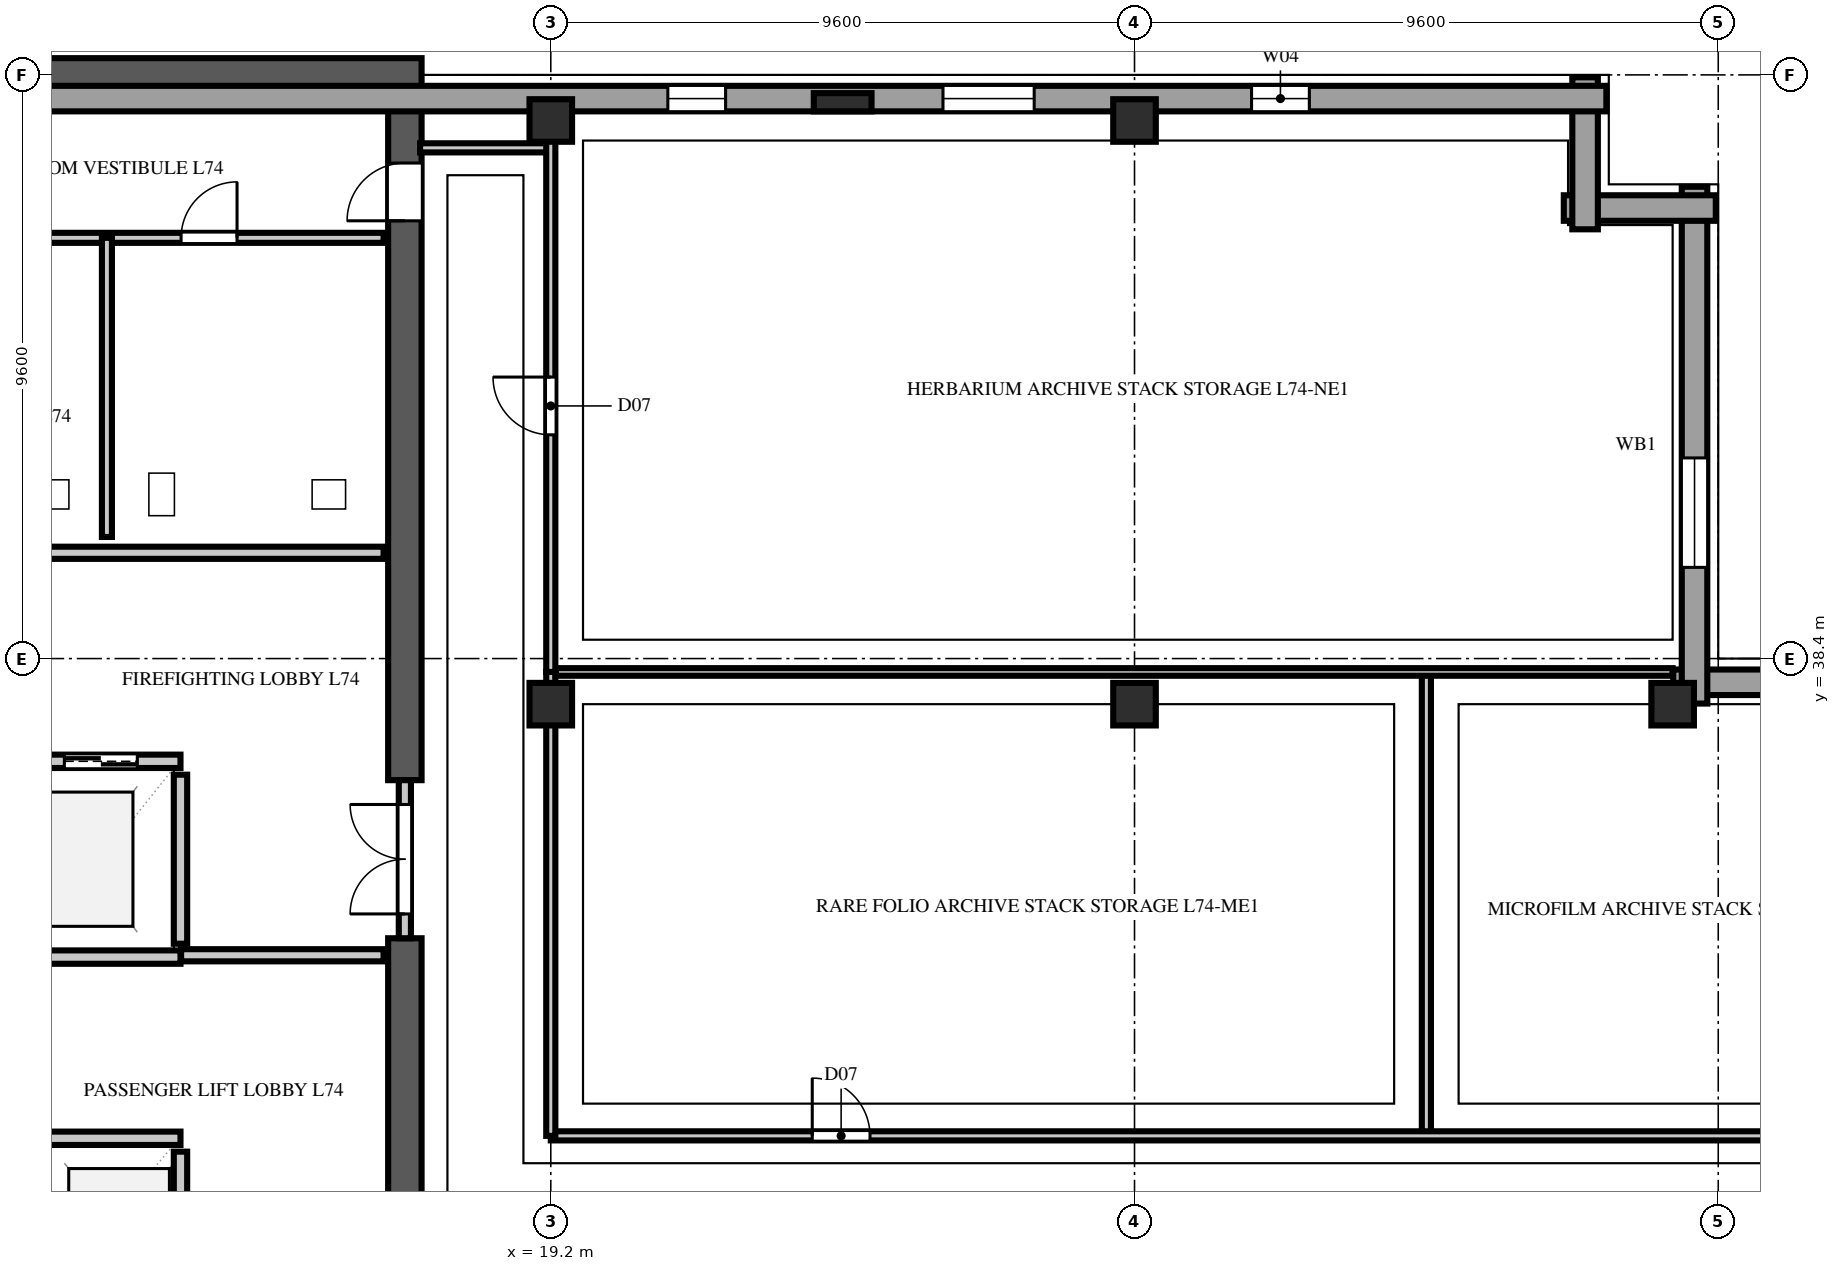
"""IFC4 building model, lengths in metres.
Left out: names, types, materials, properties, quantities, classifications, styles, units other than length and angle.
Written with IfcOpenShell. Run it as: python <this file> out.ifc"""

import sys

from ifc_helpers import new_model, si_unit, direction, frame, frame_2d, origin, origin_2d, place, context, subcontext, project, spatial, rectangle, extrude, element, fill, save


model = new_model("IFC4")
c1 = context("Model", 3, precision=1e-05, world=origin(), true_north=direction((0.0, 1.0)))
c2 = subcontext(c1, "Body", "Model", "MODEL_VIEW")
j1 = project(units=[si_unit("LENGTHUNIT", "METRE"), si_unit("PLANEANGLEUNIT", "RADIAN")], contexts=[c1])
p1 = place(None, origin())
s1 = spatial("IfcSite", under=j1, at=p1, CompositionType="ELEMENT")
p2 = place(p1, origin())
s2 = spatial("IfcBuilding", under=s1, at=p2, CompositionType="ELEMENT")
p3 = place(p2, frame((0.0, 0.0, 292.4)))
s3 = spatial("IfcBuildingStorey", under=s2, at=p3, CompositionType="ELEMENT", Elevation=292.4)
p4 = place(p3, frame((2.475, 48.0, 0.0), z_axis=(0.0, 0.0, 1.0), x_axis=(1.0, 0.0, 0.0)))
e1 = element("IfcWall", 1, at=p4, inside=s3, PredefinedType="SHEAR", context=c2, shape_type="SweptSolid", body=[
    extrude(rectangle(XDim=14.6, YDim=0.55, at=frame_2d((7.3, 0.0))), origin(), (0.0, 0.0, 1.0), 3.54),
])
p5 = place(p3, frame((16.8, 26.0, 0.0), z_axis=(0.0, 0.0, 1.0), x_axis=(0.0, 1.0, 0.0)))
e2 = element("IfcWall", 2, at=p5, inside=s3, PredefinedType="SHEAR", context=c2, shape_type="SweptSolid", body=[
    extrude(rectangle(XDim=7.8, YDim=0.55, at=frame_2d((3.9, 0.0))), origin(), (0.0, 0.0, 1.0), 3.54),
])
p6 = place(p3, frame((16.8, 36.4, 0.0), z_axis=(0.0, 0.0, 1.0), x_axis=(0.0, 1.0, 0.0)))
e3 = element("IfcWall", 3, at=p6, inside=s3, PredefinedType="SHEAR", context=c2, shape_type="SweptSolid", body=[
    extrude(rectangle(XDim=11.325, YDim=0.55, at=frame_2d((5.663, 0.0))), origin(), (0.0, 0.0, 1.0), 3.54),
])
p7 = place(p6, frame((9.2, 0.0, 0.0)))
e4 = element("IfcOpeningElement", 4, at=p7, cuts=e3, PredefinedType="OPENING", context=c2, shape_type="SweptSolid", body=[
    extrude(rectangle(XDim=0.95, YDim=2.15, at=frame_2d((0.475, 1.075))), frame((0.0, 0.287, 0.0), z_axis=(0.0, -1.0, 0.0), x_axis=(1.0, 0.0, 0.0)), (0.0, 0.0, 1.0), 0.574),
])
for number, where, z_axis, x_axis in (
    (5, (19.2, 37.65, 0.0), (0.0, 0.0, 1.0), (1.0, 0.0, 0.0)),
    (6, (19.2, 47.25, 0.0), (0.0, 0.0, 1.0), (1.0, 0.0, 0.0)),
    (7, (28.8, 37.65, 0.0), (0.0, 0.0, 1.0), (1.0, 0.0, 0.0)),
    (8, (28.8, 47.25, 0.0), (0.0, 0.0, 1.0), (1.0, 0.0, 0.0)),
    (9, (37.65, 37.65, 0.0), (0.0, 0.0, 1.0), (1.0, 0.0, 0.0)),
):
    element("IfcColumn", number, at=place(p3, frame(where, z_axis=z_axis, x_axis=x_axis)), inside=s3, PredefinedType="COLUMN", context=c2, shape_type="SweptSolid", body=[
        extrude(rectangle(XDim=0.7, YDim=0.7, at=origin_2d()), origin(), (0.0, 0.0, 1.0), 3.8),
    ])
p8 = place(p3, frame((24.0, 47.55, 0.0), z_axis=(0.0, 0.0, 1.0), x_axis=(1.0, 0.0, 0.0)))
e10 = element("IfcColumn", 10, at=p8, inside=s3, PredefinedType="PILASTER", context=c2, shape_type="SweptSolid", body=[
    extrude(rectangle(XDim=0.95, YDim=0.3, at=origin_2d()), origin(), (0.0, 0.0, 1.0), 3.8),
])
p9 = place(p3, frame((46.16, 38.01, 0.0), z_axis=(0.0, 0.0, 1.0), x_axis=(-1.0, 0.0, 0.0)))
e11 = element("IfcWall", 11, at=p9, inside=s3, PredefinedType="SOLIDWALL", context=c2, shape_type="SweptSolid", body=[
    extrude(rectangle(XDim=8.5, YDim=0.42, at=frame_2d((4.25, 0.0))), origin(), (0.0, 0.0, 1.0), 3.54),
])
p10 = place(p9, frame((4.46, 0.0, 0.85)))
e12 = element("IfcOpeningElement", 12, at=p10, cuts=e11, PredefinedType="OPENING", context=c2, shape_type="SweptSolid", body=[
    extrude(rectangle(XDim=1.8, YDim=1.85, at=frame_2d((0.9, 0.925))), frame((0.0, 0.222, 0.0), z_axis=(0.0, -1.0, 0.0), x_axis=(1.0, 0.0, 0.0)), (0.0, 0.0, 1.0), 0.444),
])
p11 = place(p3, frame((38.01, 37.66, 0.0), z_axis=(0.0, 0.0, 1.0), x_axis=(0.0, 1.0, 0.0)))
e13 = element("IfcWall", 13, at=p11, inside=s3, PredefinedType="SOLIDWALL", context=c2, shape_type="SweptSolid", body=[
    extrude(rectangle(XDim=8.5, YDim=0.42, at=frame_2d((4.25, 0.0))), origin(), (0.0, 0.0, 1.0), 3.54),
])
p12 = place(p11, frame((2.24, 0.0, 0.85)))
e14 = element("IfcOpeningElement", 14, at=p12, cuts=e13, PredefinedType="OPENING", context=c2, shape_type="SweptSolid", body=[
    extrude(rectangle(XDim=1.8, YDim=1.85, at=frame_2d((0.9, 0.925))), frame((0.0, 0.222, 0.0), z_axis=(0.0, -1.0, 0.0), x_axis=(1.0, 0.0, 0.0)), (0.0, 0.0, 1.0), 0.444),
])
for number, where, z_axis, x_axis in (
    (15, (38.36, 45.81, 0.0), (0.0, 0.0, 1.0), (-1.0, 0.0, 0.0)),
    (16, (36.21, 45.46, 0.0), (0.0, 0.0, 1.0), (0.0, 1.0, 0.0)),
):
    element("IfcWall", number, at=place(p3, frame(where, z_axis=z_axis, x_axis=x_axis)), inside=s3, PredefinedType="SOLIDWALL", context=c2, shape_type="SweptSolid", body=[
        extrude(rectangle(XDim=2.5, YDim=0.42, at=frame_2d((1.25, 0.0))), origin(), (0.0, 0.0, 1.0), 3.54),
    ])
p13 = place(p3, frame((36.56, 47.61, 0.0), z_axis=(0.0, 0.0, 1.0), x_axis=(-1.0, 0.0, 0.0)))
e17 = element("IfcWall", 17, at=p13, inside=s3, PredefinedType="SOLIDWALL", context=c2, shape_type="SweptSolid", body=[
    extrude(rectangle(XDim=34.085, YDim=0.42, at=frame_2d((17.042, 0.0))), origin(), (0.0, 0.0, 1.0), 3.54),
])
p14 = place(p13, frame((4.885, 0.0, 0.9)))
e18 = element("IfcOpeningElement", 18, at=p14, cuts=e17, PredefinedType="OPENING", context=c2, shape_type="SweptSolid", body=[
    extrude(rectangle(XDim=0.95, YDim=1.85, at=frame_2d((0.475, 0.925))), frame((0.0, 0.222, 0.0), z_axis=(0.0, -1.0, 0.0), x_axis=(1.0, 0.0, 0.0)), (0.0, 0.0, 1.0), 0.444),
])
p15 = place(p13, frame((9.41, 0.0, 0.9)))
e19 = element("IfcOpeningElement", 19, at=p15, cuts=e17, PredefinedType="OPENING", context=c2, shape_type="SweptSolid", body=[
    extrude(rectangle(XDim=1.5, YDim=1.85, at=frame_2d((0.75, 0.925))), frame((0.0, 0.222, 0.0), z_axis=(0.0, -1.0, 0.0), x_axis=(1.0, 0.0, 0.0)), (0.0, 0.0, 1.0), 0.444),
])
p16 = place(p13, frame((14.485, 0.0, 0.9)))
e20 = element("IfcOpeningElement", 20, at=p16, cuts=e17, PredefinedType="OPENING", context=c2, shape_type="SweptSolid", body=[
    extrude(rectangle(XDim=0.95, YDim=1.85, at=frame_2d((0.475, 0.925))), frame((0.0, 0.222, 0.0), z_axis=(0.0, -1.0, 0.0), x_axis=(1.0, 0.0, 0.0)), (0.0, 0.0, 1.0), 0.444),
])
p17 = place(p3, frame((13.11, 27.71, 0.0), z_axis=(0.0, 0.0, 1.0), x_axis=(0.0, 1.0, 0.0)))
e21 = element("IfcWall", 21, at=p17, inside=s3, PredefinedType="SOLIDWALL", context=c2, shape_type="SweptSolid", body=[
    extrude(rectangle(XDim=2.58, YDim=0.22, at=frame_2d((1.29, 0.0))), origin(), (0.0, 0.0, 1.0), 3.54),
])
p18 = place(p3, frame((10.49, 30.51, 0.0), z_axis=(0.0, 0.0, 1.0), x_axis=(1.0, 0.0, 0.0)))
e22 = element("IfcWall", 22, at=p18, inside=s3, PredefinedType="SOLIDWALL", context=c2, shape_type="SweptSolid", body=[
    extrude(rectangle(XDim=2.62, YDim=0.22, at=frame_2d((1.31, 0.0))), origin(), (0.0, 0.0, 1.0), 3.54),
])
p19 = place(p3, frame((13.11, 33.71, 0.0), z_axis=(0.0, 0.0, 1.0), x_axis=(0.0, 1.0, 0.0)))
e23 = element("IfcWall", 23, at=p19, inside=s3, PredefinedType="SOLIDWALL", context=c2, shape_type="SweptSolid", body=[
    extrude(rectangle(XDim=2.78, YDim=0.22, at=frame_2d((1.39, 0.0))), origin(), (0.0, 0.0, 1.0), 3.54),
])
p20 = place(p3, frame((10.49, 33.49, 0.0), z_axis=(0.0, 0.0, 1.0), x_axis=(1.0, 0.0, 0.0)))
e24 = element("IfcWall", 24, at=p20, inside=s3, PredefinedType="SOLIDWALL", context=c2, shape_type="SweptSolid", body=[
    extrude(rectangle(XDim=2.62, YDim=0.22, at=frame_2d((1.31, 0.0))), origin(), (0.0, 0.0, 1.0), 3.54),
])
p21 = place(p3, frame((10.49, 36.71, 0.0), z_axis=(0.0, 0.0, 1.0), x_axis=(1.0, 0.0, 0.0)))
e25 = element("IfcWall", 25, at=p21, inside=s3, PredefinedType="SOLIDWALL", context=c2, shape_type="SweptSolid", body=[
    extrude(rectangle(XDim=2.62, YDim=0.22, at=frame_2d((1.31, 0.0))), origin(), (0.0, 0.0, 1.0), 3.54),
])
p22 = place(p21, frame((0.71, 0.0, 0.0)))
e26 = element("IfcOpeningElement", 26, at=p22, cuts=e25, PredefinedType="OPENING", context=c2, shape_type="SweptSolid", body=[
    extrude(rectangle(XDim=1.2, YDim=2.2, at=frame_2d((0.6, 1.1))), frame((0.0, 0.122, 0.0), z_axis=(0.0, -1.0, 0.0), x_axis=(1.0, 0.0, 0.0)), (0.0, 0.0, 1.0), 0.244),
])
p23 = place(p3, frame((13.12, 33.52, 0.0), z_axis=(0.0, 0.0, 1.0), x_axis=(1.0, 0.0, 0.0)))
e27 = element("IfcWall", 27, at=p23, inside=s3, PredefinedType="SOLIDWALL", context=c2, shape_type="SweptSolid", body=[
    extrude(rectangle(XDim=3.33, YDim=0.2, at=frame_2d((1.665, 0.0))), origin(), (0.0, 0.0, 1.0), 3.54),
])
p24 = place(p3, frame((6.32, 40.14, 0.0), z_axis=(0.0, 0.0, 1.0), x_axis=(1.0, 0.0, 0.0)))
e28 = element("IfcWall", 28, at=p24, inside=s3, PredefinedType="SOLIDWALL", context=c2, shape_type="SweptSolid", body=[
    extrude(rectangle(XDim=10.13, YDim=0.2, at=frame_2d((5.065, 0.0))), origin(), (0.0, 0.0, 1.0), 3.54),
])
p25 = place(p3, frame((16.8, 33.8, 0.0), z_axis=(0.0, 0.0, 1.0), x_axis=(0.0, 1.0, 0.0)))
e29 = element("IfcWall", 29, at=p25, inside=s3, PredefinedType="SOLIDWALL", context=c2, shape_type="SweptSolid", body=[
    extrude(rectangle(XDim=2.6, YDim=0.2, at=frame_2d((1.3, 0.0))), origin(), (0.0, 0.0, 1.0), 3.54),
])
p26 = place(p25, frame((0.4, 0.0, 0.0)))
e30 = element("IfcOpeningElement", 30, at=p26, cuts=e29, PredefinedType="OPENING", context=c2, shape_type="SweptSolid", body=[
    extrude(rectangle(XDim=1.8, YDim=2.2, at=frame_2d((0.9, 1.1))), frame((0.0, 0.112, 0.0), z_axis=(0.0, -1.0, 0.0), x_axis=(1.0, 0.0, 0.0)), (0.0, 0.0, 1.0), 0.224),
])
p27 = place(p3, frame((6.32, 45.32, 0.0), z_axis=(0.0, 0.0, 1.0), x_axis=(1.0, 0.0, 0.0)))
e31 = element("IfcWall", 31, at=p27, inside=s3, PredefinedType="PLUMBINGWALL", context=c2, shape_type="SweptSolid", body=[
    extrude(rectangle(XDim=10.13, YDim=0.165, at=frame_2d((5.065, 0.0))), origin(), (0.0, 0.0, 1.0), 3.54),
])
p28 = place(p27, frame((1.8, 0.0, 0.0)))
e32 = element("IfcOpeningElement", 32, at=p28, cuts=e31, PredefinedType="OPENING", context=c2, shape_type="SweptSolid", body=[
    extrude(rectangle(XDim=0.92, YDim=2.15, at=frame_2d((0.46, 1.075))), frame((0.0, 0.094, 0.0), z_axis=(0.0, -1.0, 0.0), x_axis=(1.0, 0.0, 0.0)), (0.0, 0.0, 1.0), 0.189),
])
p29 = place(p27, frame((6.8, 0.0, 0.0)))
e33 = element("IfcOpeningElement", 33, at=p29, cuts=e31, PredefinedType="OPENING", context=c2, shape_type="SweptSolid", body=[
    extrude(rectangle(XDim=0.92, YDim=2.15, at=frame_2d((0.46, 1.075))), frame((0.0, 0.094, 0.0), z_axis=(0.0, -1.0, 0.0), x_axis=(1.0, 0.0, 0.0)), (0.0, 0.0, 1.0), 0.189),
])
p30 = place(p3, frame((11.9, 40.4, 0.0), z_axis=(0.0, 0.0, 1.0), x_axis=(0.0, 1.0, 0.0)))
e34 = element("IfcWall", 34, at=p30, inside=s3, PredefinedType="PLUMBINGWALL", context=c2, shape_type="SweptSolid", body=[
    extrude(rectangle(XDim=4.92, YDim=0.165, at=frame_2d((2.46, 0.0))), origin(), (0.0, 0.0, 1.0), 3.54),
])
p31 = place(p3, frame((17.05, 46.8, 0.0), z_axis=(0.0, 0.0, 1.0), x_axis=(1.0, 0.0, 0.0)))
e35 = element("IfcWall", 35, at=p31, inside=s3, PredefinedType="PARTITIONING", context=c2, shape_type="SweptSolid", body=[
    extrude(rectangle(XDim=2.15, YDim=0.15, at=frame_2d((1.075, 0.0))), origin(), (0.0, 0.0, 1.0), 3.54),
])
p32 = place(p3, frame((33.6, 30.55, 0.0), z_axis=(0.0, 0.0, 1.0), x_axis=(0.0, 1.0, 0.0)))
e36 = element("IfcWall", 36, at=p32, inside=s3, PredefinedType="PARTITIONING", context=c2, shape_type="SweptSolid", body=[
    extrude(rectangle(XDim=7.63, YDim=0.15, at=frame_2d((3.815, 0.0))), origin(), (0.0, 0.0, 1.0), 3.54),
])
p33 = place(p3, frame((19.2, 30.55, 0.0), z_axis=(0.0, 0.0, 1.0), x_axis=(1.0, 0.0, 0.0)))
e37 = element("IfcWall", 37, at=p33, inside=s3, PredefinedType="PARTITIONING", context=c2, shape_type="SweptSolid", body=[
    extrude(rectangle(XDim=28.58, YDim=0.15, at=frame_2d((14.29, 0.0))), origin(), (0.0, 0.0, 1.0), 3.54),
])
p34 = place(p33, frame((4.3, 0.0, 0.0)))
e38 = element("IfcOpeningElement", 38, at=p34, cuts=e37, PredefinedType="OPENING", context=c2, shape_type="SweptSolid", body=[
    extrude(rectangle(XDim=0.95, YDim=2.15, at=frame_2d((0.475, 1.075))), frame((0.0, 0.087, 0.0), z_axis=(0.0, -1.0, 0.0), x_axis=(1.0, 0.0, 0.0)), (0.0, 0.0, 1.0), 0.174),
])
p35 = place(p33, frame((22.45, 0.0, 0.0)))
e39 = element("IfcOpeningElement", 39, at=p35, cuts=e37, PredefinedType="OPENING", context=c2, shape_type="SweptSolid", body=[
    extrude(rectangle(XDim=0.95, YDim=2.15, at=frame_2d((0.475, 1.075))), frame((0.0, 0.087, 0.0), z_axis=(0.0, -1.0, 0.0), x_axis=(1.0, 0.0, 0.0)), (0.0, 0.0, 1.0), 0.174),
])
p36 = place(p3, frame((19.2, 30.55, 0.0), z_axis=(0.0, 0.0, 1.0), x_axis=(0.0, 1.0, 0.0)))
e40 = element("IfcWall", 40, at=p36, inside=s3, PredefinedType="PARTITIONING", context=c2, shape_type="SweptSolid", body=[
    extrude(rectangle(XDim=7.63, YDim=0.15, at=frame_2d((3.815, 0.0))), origin(), (0.0, 0.0, 1.0), 3.184),
])
p37 = place(p3, frame((19.28, 38.18, 0.0), z_axis=(0.0, 0.0, 1.0), x_axis=(1.0, 0.0, 0.0)))
e41 = element("IfcWall", 41, at=p37, inside=s3, PredefinedType="PARTITIONING", context=c2, shape_type="SweptSolid", body=[
    extrude(rectangle(XDim=18.37, YDim=0.125, at=frame_2d((9.185, 0.0))), origin(), (0.0, 0.0, 1.0), 3.54),
])
p38 = place(p3, frame((19.2, 38.18, 0.0), z_axis=(0.0, 0.0, 1.0), x_axis=(0.0, 1.0, 0.0)))
e42 = element("IfcWall", 42, at=p38, inside=s3, PredefinedType="PARTITIONING", context=c2, shape_type="SweptSolid", body=[
    extrude(rectangle(XDim=9.27, YDim=0.15, at=frame_2d((4.635, 0.0))), origin(), (0.0, 0.0, 1.0), 3.184),
])
p39 = place(p38, frame((3.9, 0.0, 0.0)))
e43 = element("IfcOpeningElement", 43, at=p39, cuts=e42, PredefinedType="OPENING", context=c2, shape_type="SweptSolid", body=[
    extrude(rectangle(XDim=0.95, YDim=2.15, at=frame_2d((0.475, 1.075))), frame((0.0, 0.087, 0.0), z_axis=(0.0, -1.0, 0.0), x_axis=(1.0, 0.0, 0.0)), (0.0, 0.0, 1.0), 0.174),
])
p40 = place(p12, origin())
e44 = element("IfcWindow", 44, at=p40, inside=s3, PartitioningType="DOUBLE_PANEL_VERTICAL", PredefinedType="WINDOW", context=c2, shape_type="SweptSolid", body=[
    extrude(rectangle(XDim=1.8, YDim=1.85, at=frame_2d((0.9, 0.925))), frame((0.0, 0.11, 0.0), z_axis=(0.0, -1.0, 0.0), x_axis=(1.0, 0.0, 0.0)), (0.0, 0.0, 1.0), 0.06),
])
fill(e14, e44)
p41 = place(p14, origin())
e45 = element("IfcWindow", 45, at=p41, inside=s3, PartitioningType="SINGLE_PANEL", PredefinedType="WINDOW", context=c2, shape_type="SweptSolid", body=[
    extrude(rectangle(XDim=0.95, YDim=1.85, at=frame_2d((0.475, 0.925))), frame((0.0, 0.11, 0.0), z_axis=(0.0, -1.0, 0.0), x_axis=(1.0, 0.0, 0.0)), (0.0, 0.0, 1.0), 0.06),
])
fill(e18, e45)
p42 = place(p15, origin())
e46 = element("IfcWindow", 46, at=p42, inside=s3, PartitioningType="DOUBLE_PANEL_VERTICAL", PredefinedType="WINDOW", context=c2, shape_type="SweptSolid", body=[
    extrude(rectangle(XDim=1.5, YDim=1.85, at=frame_2d((0.75, 0.925))), frame((0.0, 0.11, 0.0), z_axis=(0.0, -1.0, 0.0), x_axis=(1.0, 0.0, 0.0)), (0.0, 0.0, 1.0), 0.06),
])
fill(e19, e46)
p43 = place(p16, origin())
e47 = element("IfcWindow", 47, at=p43, inside=s3, PartitioningType="SINGLE_PANEL", PredefinedType="WINDOW", context=c2, shape_type="SweptSolid", body=[
    extrude(rectangle(XDim=0.95, YDim=1.85, at=frame_2d((0.475, 0.925))), frame((0.0, 0.11, 0.0), z_axis=(0.0, -1.0, 0.0), x_axis=(1.0, 0.0, 0.0)), (0.0, 0.0, 1.0), 0.06),
])
fill(e20, e47)
p44 = place(p22, origin())
e48 = element("IfcDoor", 48, at=p44, inside=s3, OperationType="DOUBLE_DOOR_SLIDING", PredefinedType="DOOR", context=c2, shape_type="SweptSolid", body=[
    extrude(rectangle(XDim=1.2, YDim=2.2, at=frame_2d((0.6, 1.1))), frame((0.0, 0.025, 0.0), z_axis=(0.0, -1.0, 0.0), x_axis=(1.0, 0.0, 0.0)), (0.0, 0.0, 1.0), 0.05),
])
fill(e26, e48)
p45 = place(p7, origin())
e49 = element("IfcDoor", 49, at=p45, inside=s3, OperationType="SINGLE_SWING_LEFT", PredefinedType="DOOR", context=c2, shape_type="SweptSolid", body=[
    extrude(rectangle(XDim=0.95, YDim=2.15, at=frame_2d((0.475, 1.075))), frame((0.0, 0.025, 0.0), z_axis=(0.0, -1.0, 0.0), x_axis=(1.0, 0.0, 0.0)), (0.0, 0.0, 1.0), 0.05),
])
fill(e4, e49)
p46 = place(p26, origin())
e50 = element("IfcDoor", 50, at=p46, inside=s3, OperationType="DOUBLE_DOOR_SINGLE_SWING", PredefinedType="DOOR", context=c2, shape_type="SweptSolid", body=[
    extrude(rectangle(XDim=1.8, YDim=2.2, at=frame_2d((0.9, 1.1))), frame((0.0, 0.025, 0.0), z_axis=(0.0, -1.0, 0.0), x_axis=(1.0, 0.0, 0.0)), (0.0, 0.0, 1.0), 0.05),
])
fill(e30, e50)
p47 = place(p29, origin())
e51 = element("IfcDoor", 51, at=p47, inside=s3, OperationType="SINGLE_SWING_RIGHT", PredefinedType="DOOR", context=c2, shape_type="SweptSolid", body=[
    extrude(rectangle(XDim=0.92, YDim=2.15, at=frame_2d((0.46, 1.075))), frame((0.0, 0.025, 0.0), z_axis=(0.0, -1.0, 0.0), x_axis=(1.0, 0.0, 0.0)), (0.0, 0.0, 1.0), 0.05),
])
fill(e33, e51)
p48 = place(p34, origin())
e52 = element("IfcDoor", 52, at=p48, inside=s3, OperationType="SINGLE_SWING_LEFT", PredefinedType="DOOR", context=c2, shape_type="SweptSolid", body=[
    extrude(rectangle(XDim=0.95, YDim=2.15, at=frame_2d((0.475, 1.075))), frame((0.0, 0.025, 0.0), z_axis=(0.0, -1.0, 0.0), x_axis=(1.0, 0.0, 0.0)), (0.0, 0.0, 1.0), 0.05),
])
fill(e38, e52)
p49 = place(p39, origin())
e53 = element("IfcDoor", 53, at=p49, inside=s3, OperationType="SINGLE_SWING_RIGHT", PredefinedType="DOOR", context=c2, shape_type="SweptSolid", body=[
    extrude(rectangle(XDim=0.95, YDim=2.15, at=frame_2d((0.475, 1.075))), frame((0.0, 0.025, 0.0), z_axis=(0.0, -1.0, 0.0), x_axis=(1.0, 0.0, 0.0)), (0.0, 0.0, 1.0), 0.05),
])
fill(e43, e53)
save(model, sys.argv[1])
